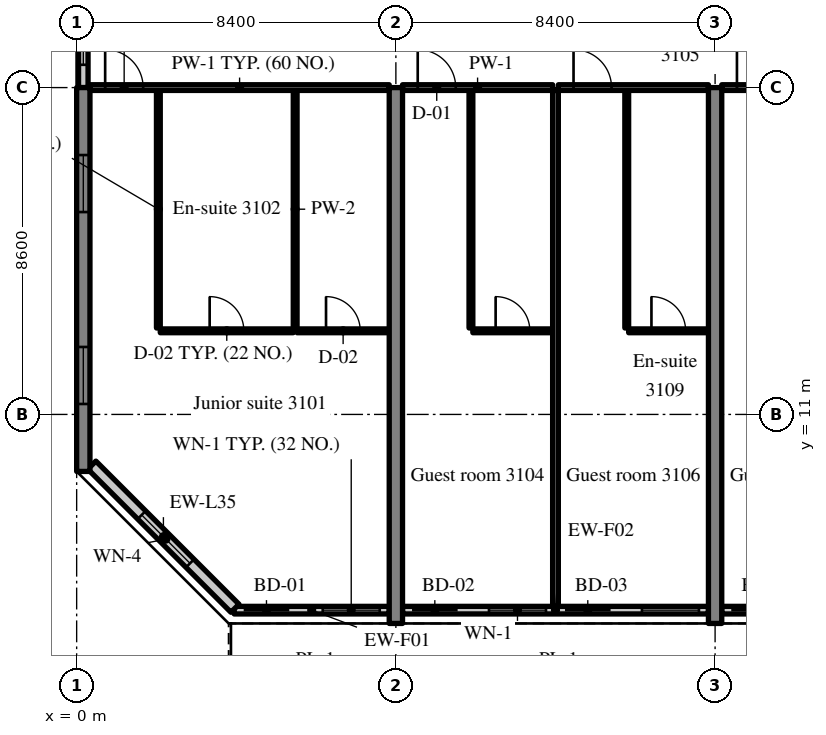
"""IFC4 building model, lengths in metres.
Left out: names, types, materials, properties, quantities, classifications, styles, units other than length and angle.
Written with IfcOpenShell. Run it as: python <this file> out.ifc"""

import sys

from ifc_helpers import new_model, si_unit, direction, frame, frame_2d, origin, place, context, subcontext, project, spatial, rectangle, extrude, source, transform, mapped, element, fill, save


model = new_model("IFC4")
c1 = context("Model", 3, precision=1e-05, world=origin(), true_north=direction((0.0, 1.0)))
c2 = subcontext(c1, "Body", "Model", "MODEL_VIEW")
j1 = project(units=[si_unit("LENGTHUNIT", "METRE"), si_unit("PLANEANGLEUNIT", "RADIAN")], contexts=[c1])
p1 = place(None, origin())
s1 = spatial("IfcSite", under=j1, at=p1, CompositionType="ELEMENT")
p2 = place(p1, origin())
s2 = spatial("IfcBuilding", under=s1, at=p2, CompositionType="ELEMENT")
p3 = place(p2, frame((0.0, 0.0, 129.4)))
s3 = spatial("IfcBuildingStorey", under=s2, at=p3, CompositionType="ELEMENT", Elevation=129.4)
m1 = source(origin(), c2, "Body", "SweptSolid", [
    extrude(rectangle(XDim=10.1, YDim=0.35, at=frame_2d((5.05, 0.0))), origin(), (0.0, 0.0, 1.0), 3.52),
])
p4 = place(p3, frame((0.175, 9.5, 0.0), z_axis=(0.0, 0.0, 1.0), x_axis=(0.0, 1.0, 0.0)))
e1 = element("IfcWall", 1, at=p4, inside=s3, PredefinedType="SHEAR", context=c2, shape_type="MappedRepresentation", body=[
    mapped(m1, transform((0.0, 0.0, 0.0), scale=1.0)),
])
m2 = source(origin(), c2, "Body", "SweptSolid", [
    extrude(rectangle(XDim=1.5, YDim=1.5, at=frame_2d((0.75, 0.75))), frame((0.0, 0.185, 0.0), z_axis=(0.0, -1.0, 0.0), x_axis=(1.0, 0.0, 0.0)), (0.0, 0.0, 1.0), 0.37),
])
p5 = place(p4, frame((1.775, 0.0, 0.9)))
e2 = element("IfcOpeningElement", 2, at=p5, cuts=e1, PredefinedType="OPENING", context=c2, shape_type="MappedRepresentation", body=[
    mapped(m2, transform((0.0, 0.0, 0.0), scale=1.0)),
])
p6 = place(p4, frame((6.825, 0.0, 0.9)))
e3 = element("IfcOpeningElement", 3, at=p6, cuts=e1, PredefinedType="OPENING", context=c2, shape_type="MappedRepresentation", body=[
    mapped(m2, transform((0.0, 0.0, 0.0), scale=1.0)),
])
m3 = source(origin(), c2, "Body", "SweptSolid", [
    extrude(rectangle(XDim=14.1, YDim=0.35, at=frame_2d((7.05, 0.0))), origin(), (0.0, 0.0, 1.0), 3.52),
])
for number, where, z_axis, x_axis in (
    (4, (8.4, 5.5, 0.0), (0.0, 0.0, 1.0), (0.0, 1.0, 0.0)),
    (5, (16.8, 5.5, 0.0), (0.0, 0.0, 1.0), (0.0, 1.0, 0.0)),
):
    element("IfcWall", number, at=place(p3, frame(where, z_axis=z_axis, x_axis=x_axis)), inside=s3, PredefinedType="SHEAR", context=c2, shape_type="MappedRepresentation", body=[
        mapped(m3, transform((0.0, 0.0, 0.0), scale=1.0)),
    ])
m4 = source(origin(), c2, "Body", "SweptSolid", [
    extrude(rectangle(XDim=4.08, YDim=0.2, at=frame_2d((2.04, 0.0))), origin(), (0.0, 0.0, 1.0), 2.82),
])
p7 = place(p3, frame((4.145, 5.85, 0.0), z_axis=(0.0, 0.0, 1.0), x_axis=(1.0, 0.0, 0.0)))
e6 = element("IfcWall", 6, at=p7, inside=s3, PredefinedType="SOLIDWALL", context=c2, shape_type="MappedRepresentation", body=[
    mapped(m4, transform((0.0, 0.0, 0.0), scale=1.0)),
])
m5 = source(origin(), c2, "Body", "SweptSolid", [
    extrude(rectangle(XDim=1.2, YDim=2.4, at=frame_2d((0.6, 1.2))), frame((0.0, 0.11, 0.0), z_axis=(0.0, -1.0, 0.0), x_axis=(1.0, 0.0, 0.0)), (0.0, 0.0, 1.0), 0.22),
])
p8 = place(p7, frame((0.25, 0.0, 0.0)))
e7 = element("IfcOpeningElement", 7, at=p8, cuts=e6, PredefinedType="OPENING", context=c2, shape_type="MappedRepresentation", body=[
    mapped(m5, transform((0.0, 0.0, 0.0), scale=1.0)),
])
m6 = source(origin(), c2, "Body", "SweptSolid", [
    extrude(rectangle(XDim=1.5, YDim=1.5, at=frame_2d((0.75, 0.75))), frame((0.0, 0.11, 0.0), z_axis=(0.0, -1.0, 0.0), x_axis=(1.0, 0.0, 0.0)), (0.0, 0.0, 1.0), 0.22),
])
p9 = place(p7, frame((2.33, 0.0, 0.9)))
e8 = element("IfcOpeningElement", 8, at=p9, cuts=e6, PredefinedType="OPENING", context=c2, shape_type="MappedRepresentation", body=[
    mapped(m6, transform((0.0, 0.0, 0.0), scale=1.0)),
])
m7 = source(origin(), c2, "Body", "SweptSolid", [
    extrude(rectangle(XDim=8.05, YDim=0.2, at=frame_2d((4.025, 0.0))), origin(), (0.0, 0.0, 1.0), 2.82),
])
p10 = place(p3, frame((8.575, 5.85, 0.0), z_axis=(0.0, 0.0, 1.0), x_axis=(1.0, 0.0, 0.0)))
e9 = element("IfcWall", 9, at=p10, inside=s3, PredefinedType="SOLIDWALL", context=c2, shape_type="MappedRepresentation", body=[
    mapped(m7, transform((0.0, 0.0, 0.0), scale=1.0)),
])
p11 = place(p10, frame((0.25, 0.0, 0.0)))
e10 = element("IfcOpeningElement", 10, at=p11, cuts=e9, PredefinedType="OPENING", context=c2, shape_type="MappedRepresentation", body=[
    mapped(m5, transform((0.0, 0.0, 0.0), scale=1.0)),
])
p12 = place(p10, frame((2.275, 0.0, 0.9)))
e11 = element("IfcOpeningElement", 11, at=p12, cuts=e9, PredefinedType="OPENING", context=c2, shape_type="MappedRepresentation", body=[
    mapped(m6, transform((0.0, 0.0, 0.0), scale=1.0)),
])
p13 = place(p10, frame((4.275, 0.0, 0.0)))
e12 = element("IfcOpeningElement", 12, at=p13, cuts=e9, PredefinedType="OPENING", context=c2, shape_type="MappedRepresentation", body=[
    mapped(m5, transform((0.0, 0.0, 0.0), scale=1.0)),
])
p14 = place(p10, frame((6.3, 0.0, 0.9)))
e13 = element("IfcOpeningElement", 13, at=p14, cuts=e9, PredefinedType="OPENING", context=c2, shape_type="MappedRepresentation", body=[
    mapped(m6, transform((0.0, 0.0, 0.0), scale=1.0)),
])
m8 = source(origin(), c2, "Body", "SweptSolid", [
    extrude(rectangle(XDim=8.05, YDim=0.2, at=frame_2d((4.025, 0.0))), origin(), (0.0, 0.0, 1.0), 2.82),
])
p15 = place(p3, frame((16.975, 5.85, 0.0), z_axis=(0.0, 0.0, 1.0), x_axis=(1.0, 0.0, 0.0)))
e14 = element("IfcWall", 14, at=p15, inside=s3, PredefinedType="SOLIDWALL", context=c2, shape_type="MappedRepresentation", body=[
    mapped(m8, transform((0.0, 0.0, 0.0), scale=1.0)),
])
p16 = place(p15, frame((0.25, 0.0, 0.0)))
e15 = element("IfcOpeningElement", 15, at=p16, cuts=e14, PredefinedType="OPENING", context=c2, shape_type="MappedRepresentation", body=[
    mapped(m5, transform((0.0, 0.0, 0.0), scale=1.0)),
])
p17 = place(p15, frame((2.275, 0.0, 0.9)))
e16 = element("IfcOpeningElement", 16, at=p17, cuts=e14, PredefinedType="OPENING", context=c2, shape_type="MappedRepresentation", body=[
    mapped(m6, transform((0.0, 0.0, 0.0), scale=1.0)),
])
p18 = place(p15, frame((4.275, 0.0, 0.0)))
e17 = element("IfcOpeningElement", 17, at=p18, cuts=e14, PredefinedType="OPENING", context=c2, shape_type="MappedRepresentation", body=[
    mapped(m5, transform((0.0, 0.0, 0.0), scale=1.0)),
])
p19 = place(p15, frame((6.3, 0.0, 0.9)))
e18 = element("IfcOpeningElement", 18, at=p19, cuts=e14, PredefinedType="OPENING", context=c2, shape_type="MappedRepresentation", body=[
    mapped(m6, transform((0.0, 0.0, 0.0), scale=1.0)),
])
m9 = source(origin(), c2, "Body", "SweptSolid", [
    extrude(rectangle(XDim=5.326, YDim=0.3, at=frame_2d((2.663, 0.0))), origin(), (0.0, 0.0, 1.0), 3.52),
])
p20 = place(p3, frame((0.4, 9.666, 0.0), z_axis=(0.0, 0.0, 1.0), x_axis=(0.707106781187, -0.707106781187, 0.0)))
e19 = element("IfcWall", 19, at=p20, inside=s3, PredefinedType="SOLIDWALL", context=c2, shape_type="MappedRepresentation", body=[
    mapped(m9, transform((0.0, 0.0, 0.0), scale=1.0)),
])
m10 = source(origin(), c2, "Body", "SweptSolid", [
    extrude(rectangle(XDim=1.8, YDim=1.5, at=frame_2d((0.9, 0.75))), frame((0.0, 0.16, 0.0), z_axis=(0.0, -1.0, 0.0), x_axis=(1.0, 0.0, 0.0)), (0.0, 0.0, 1.0), 0.32),
])
p21 = place(p20, frame((1.854, 0.0, 0.9)))
e20 = element("IfcOpeningElement", 20, at=p21, cuts=e19, PredefinedType="OPENING", context=c2, shape_type="MappedRepresentation", body=[
    mapped(m10, transform((0.0, 0.0, 0.0), scale=1.0)),
])
m11 = source(origin(), c2, "Body", "SweptSolid", [
    extrude(rectangle(XDim=2.4, YDim=0.25, at=frame_2d((1.2, 0.0))), origin(), (0.0, 0.0, 1.0), 2.62),
])
p22 = place(p3, frame((0.175, 19.6, 0.0), z_axis=(0.0, 0.0, 1.0), x_axis=(0.0, 1.0, 0.0)))
e21 = element("IfcWall", 21, at=p22, inside=s3, PredefinedType="SOLIDWALL", context=c2, shape_type="MappedRepresentation", body=[
    mapped(m11, transform((0.0, 0.0, 0.0), scale=1.0)),
])
m12 = source(origin(), c2, "Body", "SweptSolid", [
    extrude(rectangle(XDim=1.2, YDim=1.5, at=frame_2d((0.6, 0.75))), frame((0.0, 0.135, 0.0), z_axis=(0.0, -1.0, 0.0), x_axis=(1.0, 0.0, 0.0)), (0.0, 0.0, 1.0), 0.27),
])
p23 = place(p22, frame((0.6, 0.0, 0.9)))
e22 = element("IfcOpeningElement", 22, at=p23, cuts=e21, PredefinedType="OPENING", context=c2, shape_type="MappedRepresentation", body=[
    mapped(m12, transform((0.0, 0.0, 0.0), scale=1.0)),
])
m13 = source(origin(), c2, "Body", "SweptSolid", [
    extrude(rectangle(XDim=6.25, YDim=0.1, at=frame_2d((3.125, 0.0))), origin(), (0.0, 0.0, 1.0), 3.52),
])
for number, where, z_axis, x_axis in (
    (23, (2.15, 13.275, 0.0), (0.0, 0.0, 1.0), (0.0, 1.0, 0.0)),
    (24, (5.75, 13.275, 0.0), (0.0, 0.0, 1.0), (0.0, 1.0, 0.0)),
):
    element("IfcWall", number, at=place(p3, frame(where, z_axis=z_axis, x_axis=x_axis)), inside=s3, PredefinedType="PARTITIONING", context=c2, shape_type="MappedRepresentation", body=[
        mapped(m13, transform((0.0, 0.0, 0.0), scale=1.0)),
    ])
m14 = source(origin(), c2, "Body", "SweptSolid", [
    extrude(rectangle(XDim=3.5, YDim=0.1, at=frame_2d((1.75, 0.0))), origin(), (0.0, 0.0, 1.0), 3.52),
])
p24 = place(p3, frame((2.2, 13.2, 0.0), z_axis=(0.0, 0.0, 1.0), x_axis=(1.0, 0.0, 0.0)))
e25 = element("IfcWall", 25, at=p24, inside=s3, PredefinedType="PARTITIONING", context=c2, shape_type="MappedRepresentation", body=[
    mapped(m14, transform((0.0, 0.0, 0.0), scale=1.0)),
])
m15 = source(origin(), c2, "Body", "SweptSolid", [
    extrude(rectangle(XDim=0.9, YDim=2.1, at=frame_2d((0.45, 1.05))), frame((0.0, 0.06, 0.0), z_axis=(0.0, -1.0, 0.0), x_axis=(1.0, 0.0, 0.0)), (0.0, 0.0, 1.0), 0.12),
])
p25 = place(p24, frame((1.3, 0.0, 0.0)))
e26 = element("IfcOpeningElement", 26, at=p25, cuts=e25, PredefinedType="OPENING", context=c2, shape_type="MappedRepresentation", body=[
    mapped(m15, transform((0.0, 0.0, 0.0), scale=1.0)),
])
m16 = source(origin(), c2, "Body", "SweptSolid", [
    extrude(rectangle(XDim=2.425, YDim=0.1, at=frame_2d((1.212, 0.0))), origin(), (0.0, 0.0, 1.0), 3.52),
])
p26 = place(p3, frame((5.8, 13.2, 0.0), z_axis=(0.0, 0.0, 1.0), x_axis=(1.0, 0.0, 0.0)))
e27 = element("IfcWall", 27, at=p26, inside=s3, PredefinedType="PARTITIONING", context=c2, shape_type="MappedRepresentation", body=[
    mapped(m16, transform((0.0, 0.0, 0.0), scale=1.0)),
])
p27 = place(p26, frame((0.762, 0.0, 0.0)))
e28 = element("IfcOpeningElement", 28, at=p27, cuts=e27, PredefinedType="OPENING", context=c2, shape_type="MappedRepresentation", body=[
    mapped(m15, transform((0.0, 0.0, 0.0), scale=1.0)),
])
m17 = source(origin(), c2, "Body", "SweptSolid", [
    extrude(rectangle(XDim=7.875, YDim=0.15, at=frame_2d((3.938, 0.0))), origin(), (0.0, 0.0, 1.0), 2.82),
])
p28 = place(p3, frame((0.35, 19.6, 0.0), z_axis=(0.0, 0.0, 1.0), x_axis=(1.0, 0.0, 0.0)))
e29 = element("IfcWall", 29, at=p28, inside=s3, PredefinedType="PARTITIONING", context=c2, shape_type="MappedRepresentation", body=[
    mapped(m17, transform((0.0, 0.0, 0.0), scale=1.0)),
])
m18 = source(origin(), c2, "Body", "SweptSolid", [
    extrude(rectangle(XDim=1.0, YDim=2.1, at=frame_2d((0.5, 1.05))), frame((0.0, 0.085, 0.0), z_axis=(0.0, -1.0, 0.0), x_axis=(1.0, 0.0, 0.0)), (0.0, 0.0, 1.0), 0.17),
])
p29 = place(p28, frame((0.4, 0.0, 0.0)))
e30 = element("IfcOpeningElement", 30, at=p29, cuts=e29, PredefinedType="OPENING", context=c2, shape_type="MappedRepresentation", body=[
    mapped(m18, transform((0.0, 0.0, 0.0), scale=1.0)),
])
p30 = place(p3, frame((10.375, 13.275, 0.0), z_axis=(0.0, 0.0, 1.0), x_axis=(0.0, 1.0, 0.0)))
e31 = element("IfcWall", 31, at=p30, inside=s3, PredefinedType="PARTITIONING", context=c2, shape_type="MappedRepresentation", body=[
    mapped(m13, transform((0.0, 0.0, 0.0), scale=1.0)),
])
m19 = source(origin(), c2, "Body", "SweptSolid", [
    extrude(rectangle(XDim=2.1, YDim=0.1, at=frame_2d((1.05, 0.0))), origin(), (0.0, 0.0, 1.0), 3.52),
])
p31 = place(p3, frame((10.425, 13.2, 0.0), z_axis=(0.0, 0.0, 1.0), x_axis=(1.0, 0.0, 0.0)))
e32 = element("IfcWall", 32, at=p31, inside=s3, PredefinedType="PARTITIONING", context=c2, shape_type="MappedRepresentation", body=[
    mapped(m19, transform((0.0, 0.0, 0.0), scale=1.0)),
])
p32 = place(p31, frame((0.6, 0.0, 0.0)))
e33 = element("IfcOpeningElement", 33, at=p32, cuts=e32, PredefinedType="OPENING", context=c2, shape_type="MappedRepresentation", body=[
    mapped(m15, transform((0.0, 0.0, 0.0), scale=1.0)),
])
m20 = source(origin(), c2, "Body", "SweptSolid", [
    extrude(rectangle(XDim=3.95, YDim=0.15, at=frame_2d((1.975, 0.0))), origin(), (0.0, 0.0, 1.0), 2.82),
])
p33 = place(p3, frame((8.575, 19.6, 0.0), z_axis=(0.0, 0.0, 1.0), x_axis=(1.0, 0.0, 0.0)))
e34 = element("IfcWall", 34, at=p33, inside=s3, PredefinedType="PARTITIONING", context=c2, shape_type="MappedRepresentation", body=[
    mapped(m20, transform((0.0, 0.0, 0.0), scale=1.0)),
])
p34 = place(p33, frame((0.4, 0.0, 0.0)))
e35 = element("IfcOpeningElement", 35, at=p34, cuts=e34, PredefinedType="OPENING", context=c2, shape_type="MappedRepresentation", body=[
    mapped(m18, transform((0.0, 0.0, 0.0), scale=1.0)),
])
p35 = place(p3, frame((14.475, 13.275, 0.0), z_axis=(0.0, 0.0, 1.0), x_axis=(0.0, 1.0, 0.0)))
e36 = element("IfcWall", 36, at=p35, inside=s3, PredefinedType="PARTITIONING", context=c2, shape_type="MappedRepresentation", body=[
    mapped(m13, transform((0.0, 0.0, 0.0), scale=1.0)),
])
m21 = source(origin(), c2, "Body", "SweptSolid", [
    extrude(rectangle(XDim=2.1, YDim=0.1, at=frame_2d((1.05, 0.0))), origin(), (0.0, 0.0, 1.0), 3.52),
])
p36 = place(p3, frame((14.525, 13.2, 0.0), z_axis=(0.0, 0.0, 1.0), x_axis=(1.0, 0.0, 0.0)))
e37 = element("IfcWall", 37, at=p36, inside=s3, PredefinedType="PARTITIONING", context=c2, shape_type="MappedRepresentation", body=[
    mapped(m21, transform((0.0, 0.0, 0.0), scale=1.0)),
])
p37 = place(p36, frame((0.6, 0.0, 0.0)))
e38 = element("IfcOpeningElement", 38, at=p37, cuts=e37, PredefinedType="OPENING", context=c2, shape_type="MappedRepresentation", body=[
    mapped(m15, transform((0.0, 0.0, 0.0), scale=1.0)),
])
p38 = place(p3, frame((12.675, 19.6, 0.0), z_axis=(0.0, 0.0, 1.0), x_axis=(1.0, 0.0, 0.0)))
e39 = element("IfcWall", 39, at=p38, inside=s3, PredefinedType="PARTITIONING", context=c2, shape_type="MappedRepresentation", body=[
    mapped(m20, transform((0.0, 0.0, 0.0), scale=1.0)),
])
p39 = place(p38, frame((0.4, 0.0, 0.0)))
e40 = element("IfcOpeningElement", 40, at=p39, cuts=e39, PredefinedType="OPENING", context=c2, shape_type="MappedRepresentation", body=[
    mapped(m18, transform((0.0, 0.0, 0.0), scale=1.0)),
])
m22 = source(origin(), c2, "Body", "SweptSolid", [
    extrude(rectangle(XDim=13.575, YDim=0.15, at=frame_2d((6.788, 0.0))), origin(), (0.0, 0.0, 1.0), 3.52),
])
p40 = place(p3, frame((12.6, 5.95, 0.0), z_axis=(0.0, 0.0, 1.0), x_axis=(0.0, 1.0, 0.0)))
e41 = element("IfcWall", 41, at=p40, inside=s3, PredefinedType="PARTITIONING", context=c2, shape_type="MappedRepresentation", body=[
    mapped(m22, transform((0.0, 0.0, 0.0), scale=1.0)),
])
p41 = place(p3, frame((16.975, 19.6, 0.0), z_axis=(0.0, 0.0, 1.0), x_axis=(1.0, 0.0, 0.0)))
e42 = element("IfcWall", 42, at=p41, inside=s3, PredefinedType="PARTITIONING", context=c2, shape_type="MappedRepresentation", body=[
    mapped(m20, transform((0.0, 0.0, 0.0), scale=1.0)),
])
p42 = place(p41, frame((0.4, 0.0, 0.0)))
e43 = element("IfcOpeningElement", 43, at=p42, cuts=e42, PredefinedType="OPENING", context=c2, shape_type="MappedRepresentation", body=[
    mapped(m18, transform((0.0, 0.0, 0.0), scale=1.0)),
])
m23 = source(origin(), c2, "Body", "SweptSolid", [
    extrude(rectangle(XDim=1.2, YDim=2.4, at=frame_2d((0.6, 1.2))), frame((0.0, 0.025, 0.0), z_axis=(0.0, -1.0, 0.0), x_axis=(1.0, 0.0, 0.0)), (0.0, 0.0, 1.0), 0.05),
])
p43 = place(p8, origin())
e44 = element("IfcDoor", 44, at=p43, inside=s3, OperationType="SLIDING_TO_LEFT", PredefinedType="DOOR", context=c2, shape_type="MappedRepresentation", body=[
    mapped(m23, transform((0.0, 0.0, 0.0), scale=1.0)),
])
fill(e7, e44)
m24 = source(origin(), c2, "Body", "SweptSolid", [
    extrude(rectangle(XDim=1.5, YDim=1.5, at=frame_2d((0.75, 0.75))), frame((0.0, 0.03, 0.0), z_axis=(0.0, -1.0, 0.0), x_axis=(1.0, 0.0, 0.0)), (0.0, 0.0, 1.0), 0.06),
])
p44 = place(p9, origin())
e45 = element("IfcWindow", 45, at=p44, inside=s3, PartitioningType="SINGLE_PANEL", PredefinedType="WINDOW", context=c2, shape_type="MappedRepresentation", body=[
    mapped(m24, transform((0.0, 0.0, 0.0), scale=1.0)),
])
fill(e8, e45)
p45 = place(p11, origin())
e46 = element("IfcDoor", 46, at=p45, inside=s3, OperationType="SLIDING_TO_RIGHT", PredefinedType="DOOR", context=c2, shape_type="MappedRepresentation", body=[
    mapped(m23, transform((0.0, 0.0, 0.0), scale=1.0)),
])
fill(e10, e46)
p46 = place(p12, origin())
e47 = element("IfcWindow", 47, at=p46, inside=s3, PartitioningType="SINGLE_PANEL", PredefinedType="WINDOW", context=c2, shape_type="MappedRepresentation", body=[
    mapped(m24, transform((0.0, 0.0, 0.0), scale=1.0)),
])
fill(e11, e47)
p47 = place(p13, origin())
e48 = element("IfcDoor", 48, at=p47, inside=s3, OperationType="SLIDING_TO_LEFT", PredefinedType="DOOR", context=c2, shape_type="MappedRepresentation", body=[
    mapped(m23, transform((0.0, 0.0, 0.0), scale=1.0)),
])
fill(e12, e48)
p48 = place(p14, origin())
e49 = element("IfcWindow", 49, at=p48, inside=s3, PartitioningType="SINGLE_PANEL", PredefinedType="WINDOW", context=c2, shape_type="MappedRepresentation", body=[
    mapped(m24, transform((0.0, 0.0, 0.0), scale=1.0)),
])
fill(e13, e49)
p49 = place(p16, origin())
e50 = element("IfcDoor", 50, at=p49, inside=s3, OperationType="SLIDING_TO_RIGHT", PredefinedType="DOOR", context=c2, shape_type="MappedRepresentation", body=[
    mapped(m23, transform((0.0, 0.0, 0.0), scale=1.0)),
])
fill(e15, e50)
m25 = source(origin(), c2, "Body", "SweptSolid", [
    extrude(rectangle(XDim=1.8, YDim=1.5, at=frame_2d((0.9, 0.75))), frame((0.0, 0.03, 0.0), z_axis=(0.0, -1.0, 0.0), x_axis=(1.0, 0.0, 0.0)), (0.0, 0.0, 1.0), 0.06),
])
p50 = place(p21, origin())
e51 = element("IfcWindow", 51, at=p50, inside=s3, PartitioningType="SINGLE_PANEL", PredefinedType="WINDOW", context=c2, shape_type="MappedRepresentation", body=[
    mapped(m25, transform((0.0, 0.0, 0.0), scale=1.0)),
])
fill(e20, e51)
p51 = place(p5, origin())
e52 = element("IfcWindow", 52, at=p51, inside=s3, PartitioningType="SINGLE_PANEL", PredefinedType="WINDOW", context=c2, shape_type="MappedRepresentation", body=[
    mapped(m24, transform((0.0, 0.0, 0.0), scale=1.0)),
])
fill(e2, e52)
p52 = place(p6, origin())
e53 = element("IfcWindow", 53, at=p52, inside=s3, PartitioningType="SINGLE_PANEL", PredefinedType="WINDOW", context=c2, shape_type="MappedRepresentation", body=[
    mapped(m24, transform((0.0, 0.0, 0.0), scale=1.0)),
])
fill(e3, e53)
m26 = source(origin(), c2, "Body", "SweptSolid", [
    extrude(rectangle(XDim=1.2, YDim=1.5, at=frame_2d((0.6, 0.75))), frame((0.0, 0.03, 0.0), z_axis=(0.0, -1.0, 0.0), x_axis=(1.0, 0.0, 0.0)), (0.0, 0.0, 1.0), 0.06),
])
p53 = place(p23, origin())
e54 = element("IfcWindow", 54, at=p53, inside=s3, PartitioningType="SINGLE_PANEL", PredefinedType="WINDOW", context=c2, shape_type="MappedRepresentation", body=[
    mapped(m26, transform((0.0, 0.0, 0.0), scale=1.0)),
])
fill(e22, e54)
m27 = source(origin(), c2, "Body", "SweptSolid", [
    extrude(rectangle(XDim=0.9, YDim=2.1, at=frame_2d((0.45, 1.05))), frame((0.0, 0.025, 0.0), z_axis=(0.0, -1.0, 0.0), x_axis=(1.0, 0.0, 0.0)), (0.0, 0.0, 1.0), 0.05),
])
p54 = place(p25, origin())
e55 = element("IfcDoor", 55, at=p54, inside=s3, OperationType="SINGLE_SWING_LEFT", PredefinedType="DOOR", context=c2, shape_type="MappedRepresentation", body=[
    mapped(m27, transform((0.0, 0.0, 0.0), scale=1.0)),
])
fill(e26, e55)
p55 = place(p27, origin())
e56 = element("IfcDoor", 56, at=p55, inside=s3, OperationType="SINGLE_SWING_LEFT", PredefinedType="DOOR", context=c2, shape_type="MappedRepresentation", body=[
    mapped(m27, transform((0.0, 0.0, 0.0), scale=1.0)),
])
fill(e28, e56)
m28 = source(origin(), c2, "Body", "SweptSolid", [
    extrude(rectangle(XDim=1.0, YDim=2.1, at=frame_2d((0.5, 1.05))), frame((0.0, 0.025, 0.0), z_axis=(0.0, -1.0, 0.0), x_axis=(1.0, 0.0, 0.0)), (0.0, 0.0, 1.0), 0.05),
])
p56 = place(p29, origin())
e57 = element("IfcDoor", 57, at=p56, inside=s3, OperationType="SINGLE_SWING_LEFT", PredefinedType="DOOR", context=c2, shape_type="MappedRepresentation", body=[
    mapped(m28, transform((0.0, 0.0, 0.0), scale=1.0)),
])
fill(e30, e57)
p57 = place(p32, origin())
e58 = element("IfcDoor", 58, at=p57, inside=s3, OperationType="SINGLE_SWING_LEFT", PredefinedType="DOOR", context=c2, shape_type="MappedRepresentation", body=[
    mapped(m27, transform((0.0, 0.0, 0.0), scale=1.0)),
])
fill(e33, e58)
p58 = place(p34, origin())
e59 = element("IfcDoor", 59, at=p58, inside=s3, OperationType="SINGLE_SWING_LEFT", PredefinedType="DOOR", context=c2, shape_type="MappedRepresentation", body=[
    mapped(m28, transform((0.0, 0.0, 0.0), scale=1.0)),
])
fill(e35, e59)
p59 = place(p37, origin())
e60 = element("IfcDoor", 60, at=p59, inside=s3, OperationType="SINGLE_SWING_LEFT", PredefinedType="DOOR", context=c2, shape_type="MappedRepresentation", body=[
    mapped(m27, transform((0.0, 0.0, 0.0), scale=1.0)),
])
fill(e38, e60)
p60 = place(p39, origin())
e61 = element("IfcDoor", 61, at=p60, inside=s3, OperationType="SINGLE_SWING_LEFT", PredefinedType="DOOR", context=c2, shape_type="MappedRepresentation", body=[
    mapped(m28, transform((0.0, 0.0, 0.0), scale=1.0)),
])
fill(e40, e61)
p61 = place(p42, origin())
e62 = element("IfcDoor", 62, at=p61, inside=s3, OperationType="SINGLE_SWING_LEFT", PredefinedType="DOOR", context=c2, shape_type="MappedRepresentation", body=[
    mapped(m28, transform((0.0, 0.0, 0.0), scale=1.0)),
])
fill(e43, e62)
save(model, sys.argv[1])
